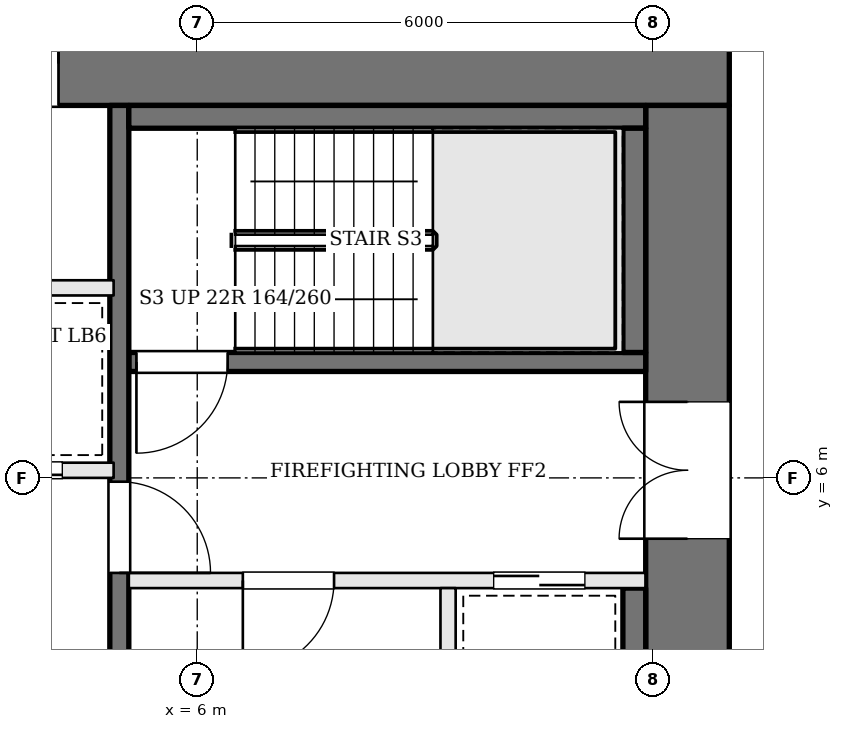
"""IFC4 building model, lengths in metres.
Left out: names, types, materials, properties, quantities, classifications, styles, units other than length and angle.
Written with IfcOpenShell. Run it as: python <this file> out.ifc"""

import sys

from ifc_helpers import new_model, si_unit, direction, frame, frame_2d, origin, place, context, subcontext, project, spatial, rectangle, extrude, element, fill, save


model = new_model("IFC4")
c1 = context("Model", 3, precision=1e-05, world=origin(), true_north=direction((0.0, 1.0)))
c2 = subcontext(c1, "Body", "Model", "MODEL_VIEW")
j1 = project(units=[si_unit("LENGTHUNIT", "METRE"), si_unit("PLANEANGLEUNIT", "RADIAN")], contexts=[c1])
p1 = place(None, origin())
s1 = spatial("IfcSite", under=j1, at=p1, CompositionType="ELEMENT")
p2 = place(p1, origin())
s2 = spatial("IfcBuilding", under=s1, at=p2, CompositionType="ELEMENT")
p3 = place(p2, frame((0.0, 0.0, 96.0)))
s3 = spatial("IfcBuildingStorey", under=s2, at=p3, CompositionType="ELEMENT", Elevation=96.0)
p4 = place(p3, frame((-13.0, 11.45, 0.0), z_axis=(0.0, 0.0, 1.0), x_axis=(1.0, 0.0, 0.0)))
e1 = element("IfcWall", 1, at=p4, inside=s3, PredefinedType="SHEAR", context=c2, shape_type="SweptSolid", body=[
    extrude(rectangle(XDim=26.0, YDim=1.1, at=frame_2d((13.0, 0.0))), origin(), (0.0, 0.0, 1.0), 3.6),
])
p5 = place(p4, frame((8.575, 0.0, 0.0)))
e2 = element("IfcOpeningElement", 2, at=p5, cuts=e1, PredefinedType="OPENING", context=c2, shape_type="SweptSolid", body=[
    extrude(rectangle(XDim=0.7, YDim=2.1, at=frame_2d((0.35, 1.05))), frame((0.0, 0.56, 0.0), z_axis=(0.0, -1.0, 0.0), x_axis=(1.0, 0.0, 0.0)), (0.0, 0.0, 1.0), 1.12),
])
p6 = place(p4, frame((10.875, 0.0, 0.0)))
e3 = element("IfcOpeningElement", 3, at=p6, cuts=e1, PredefinedType="OPENING", context=c2, shape_type="SweptSolid", body=[
    extrude(rectangle(XDim=1.0, YDim=2.1, at=frame_2d((0.5, 1.05))), frame((0.0, 0.56, 0.0), z_axis=(0.0, -1.0, 0.0), x_axis=(1.0, 0.0, 0.0)), (0.0, 0.0, 1.0), 1.12),
])
p7 = place(p4, frame((13.725, 0.0, 0.0)))
e4 = element("IfcOpeningElement", 4, at=p7, cuts=e1, PredefinedType="OPENING", context=c2, shape_type="SweptSolid", body=[
    extrude(rectangle(XDim=1.0, YDim=2.1, at=frame_2d((0.5, 1.05))), frame((0.0, 0.56, 0.0), z_axis=(0.0, -1.0, 0.0), x_axis=(1.0, 0.0, 0.0)), (0.0, 0.0, 1.0), 1.12),
])
p8 = place(p4, frame((16.175, 0.0, 0.0)))
e5 = element("IfcOpeningElement", 5, at=p8, cuts=e1, PredefinedType="OPENING", context=c2, shape_type="SweptSolid", body=[
    extrude(rectangle(XDim=1.0, YDim=2.1, at=frame_2d((0.5, 1.05))), frame((0.0, 0.56, 0.0), z_axis=(0.0, -1.0, 0.0), x_axis=(1.0, 0.0, 0.0)), (0.0, 0.0, 1.0), 1.12),
])
p9 = place(p3, frame((12.45, -1.9, 0.0), z_axis=(0.0, 0.0, 1.0), x_axis=(0.0, 1.0, 0.0)))
e6 = element("IfcWall", 6, at=p9, inside=s3, PredefinedType="SHEAR", context=c2, shape_type="SweptSolid", body=[
    extrude(rectangle(XDim=12.8, YDim=1.1, at=frame_2d((6.4, 0.0))), origin(), (0.0, 0.0, 1.0), 3.6),
])
p10 = place(p9, frame((7.1, 0.0, 0.0)))
e7 = element("IfcOpeningElement", 7, at=p10, cuts=e6, PredefinedType="OPENING", context=c2, shape_type="SweptSolid", body=[
    extrude(rectangle(XDim=1.8, YDim=2.1, at=frame_2d((0.9, 1.05))), frame((0.0, 0.56, 0.0), z_axis=(0.0, -1.0, 0.0), x_axis=(1.0, 0.0, 0.0)), (0.0, 0.0, 1.0), 1.12),
])
p11 = place(p3, frame((11.9, 7.525, 0.0), z_axis=(0.0, 0.0, 1.0), x_axis=(-1.0, 0.0, 0.0)))
e8 = element("IfcWall", 8, at=p11, inside=s3, PredefinedType="SOLIDWALL", context=c2, shape_type="SweptSolid", body=[
    extrude(rectangle(XDim=6.8, YDim=0.25, at=frame_2d((3.4, 0.0))), origin(), (0.0, 0.0, 1.0), 3.4),
])
p12 = place(p11, frame((5.5, 0.0, 0.0)))
e9 = element("IfcOpeningElement", 9, at=p12, cuts=e8, PredefinedType="OPENING", context=c2, shape_type="SweptSolid", body=[
    extrude(rectangle(XDim=1.2, YDim=2.1, at=frame_2d((0.6, 1.05))), frame((0.0, 0.135, 0.0), z_axis=(0.0, -1.0, 0.0), x_axis=(1.0, 0.0, 0.0)), (0.0, 0.0, 1.0), 0.27),
])
p13 = place(p3, frame((11.9, 4.65, 0.0), z_axis=(0.0, 0.0, 1.0), x_axis=(-1.0, 0.0, 0.0)))
e10 = element("IfcWall", 10, at=p13, inside=s3, PredefinedType="SOLIDWALL", context=c2, shape_type="SweptSolid", body=[
    extrude(rectangle(XDim=6.8, YDim=0.2, at=frame_2d((3.4, 0.0))), origin(), (0.0, 0.0, 1.0), 3.4),
])
p14 = place(p13, frame((4.1, 0.0, 0.0)))
e11 = element("IfcOpeningElement", 11, at=p14, cuts=e10, PredefinedType="OPENING", context=c2, shape_type="SweptSolid", body=[
    extrude(rectangle(XDim=1.2, YDim=2.1, at=frame_2d((0.6, 1.05))), frame((0.0, 0.11, 0.0), z_axis=(0.0, -1.0, 0.0), x_axis=(1.0, 0.0, 0.0)), (0.0, 0.0, 1.0), 0.22),
])
p15 = place(p13, frame((0.8, 0.0, 0.0)))
e12 = element("IfcOpeningElement", 12, at=p15, cuts=e10, PredefinedType="OPENING", context=c2, shape_type="SweptSolid", body=[
    extrude(rectangle(XDim=1.2, YDim=2.1, at=frame_2d((0.6, 1.05))), frame((0.0, 0.11, 0.0), z_axis=(0.0, -1.0, 0.0), x_axis=(1.0, 0.0, 0.0)), (0.0, 0.0, 1.0), 0.22),
])
p16 = place(p3, frame((9.3, 4.55, 0.0), z_axis=(0.0, 0.0, 1.0), x_axis=(0.0, -1.0, 0.0)))
e13 = element("IfcWall", 13, at=p16, inside=s3, PredefinedType="SOLIDWALL", context=c2, shape_type="SweptSolid", body=[
    extrude(rectangle(XDim=3.0, YDim=0.2, at=frame_2d((1.5, 0.0))), origin(), (0.0, 0.0, 1.0), 3.4),
])
p17 = place(p3, frame((4.975, 10.9, 0.0), z_axis=(0.0, 0.0, 1.0), x_axis=(0.0, -1.0, 0.0)))
e14 = element("IfcWall", 14, at=p17, inside=s3, PredefinedType="SOLIDWALL", context=c2, shape_type="SweptSolid", body=[
    extrude(rectangle(XDim=12.8, YDim=0.25, at=frame_2d((6.4, 0.0))), origin(), (0.0, 0.0, 1.0), 3.4),
])
p18 = place(p17, frame((4.95, 0.0, 0.0)))
e15 = element("IfcOpeningElement", 15, at=p18, cuts=e14, PredefinedType="OPENING", context=c2, shape_type="SweptSolid", body=[
    extrude(rectangle(XDim=1.2, YDim=2.1, at=frame_2d((0.6, 1.05))), frame((0.0, 0.135, 0.0), z_axis=(0.0, -1.0, 0.0), x_axis=(1.0, 0.0, 0.0)), (0.0, 0.0, 1.0), 0.27),
])
p19 = place(p3, frame((11.9, 10.75, 0.0), z_axis=(0.0, 0.0, 1.0), x_axis=(-1.0, 0.0, 0.0)))
e16 = element("IfcWall", 16, at=p19, inside=s3, PredefinedType="SOLIDWALL", context=c2, shape_type="SweptSolid", body=[
    extrude(rectangle(XDim=6.8, YDim=0.3, at=frame_2d((3.4, 0.0))), origin(), (0.0, 0.0, 1.0), 3.4),
])
p20 = place(p3, frame((11.75, 10.6, 0.0), z_axis=(0.0, 0.0, 1.0), x_axis=(0.0, -1.0, 0.0)))
e17 = element("IfcWall", 17, at=p20, inside=s3, PredefinedType="SOLIDWALL", context=c2, shape_type="SweptSolid", body=[
    extrude(rectangle(XDim=2.95, YDim=0.3, at=frame_2d((1.475, 0.0))), origin(), (0.0, 0.0, 1.0), 3.4),
])
p21 = place(p3, frame((11.75, 4.55, 0.0), z_axis=(0.0, 0.0, 1.0), x_axis=(0.0, -1.0, 0.0)))
e18 = element("IfcWall", 18, at=p21, inside=s3, PredefinedType="SOLIDWALL", context=c2, shape_type="SweptSolid", body=[
    extrude(rectangle(XDim=3.0, YDim=0.3, at=frame_2d((1.5, 0.0))), origin(), (0.0, 0.0, 1.0), 3.4),
])
p22 = place(p3, frame((-4.9, 6.1, 0.0), z_axis=(0.0, 0.0, 1.0), x_axis=(1.0, 0.0, 0.0)))
e19 = element("IfcWall", 19, at=p22, inside=s3, PredefinedType="SOLIDWALL", context=c2, shape_type="SweptSolid", body=[
    extrude(rectangle(XDim=9.8, YDim=0.2, at=frame_2d((4.9, 0.0))), origin(), (0.0, 0.0, 1.0), 3.4),
])
p23 = place(p22, frame((0.675, 0.0, 0.0)))
e20 = element("IfcOpeningElement", 20, at=p23, cuts=e19, PredefinedType="OPENING", context=c2, shape_type="SweptSolid", body=[
    extrude(rectangle(XDim=1.1, YDim=2.1, at=frame_2d((0.55, 1.05))), frame((0.0, 0.11, 0.0), z_axis=(0.0, -1.0, 0.0), x_axis=(1.0, 0.0, 0.0)), (0.0, 0.0, 1.0), 0.22),
])
p24 = place(p22, frame((3.125, 0.0, 0.0)))
e21 = element("IfcOpeningElement", 21, at=p24, cuts=e19, PredefinedType="OPENING", context=c2, shape_type="SweptSolid", body=[
    extrude(rectangle(XDim=1.1, YDim=2.1, at=frame_2d((0.55, 1.05))), frame((0.0, 0.11, 0.0), z_axis=(0.0, -1.0, 0.0), x_axis=(1.0, 0.0, 0.0)), (0.0, 0.0, 1.0), 0.22),
])
p25 = place(p22, frame((5.575, 0.0, 0.0)))
e22 = element("IfcOpeningElement", 22, at=p25, cuts=e19, PredefinedType="OPENING", context=c2, shape_type="SweptSolid", body=[
    extrude(rectangle(XDim=1.1, YDim=2.1, at=frame_2d((0.55, 1.05))), frame((0.0, 0.11, 0.0), z_axis=(0.0, -1.0, 0.0), x_axis=(1.0, 0.0, 0.0)), (0.0, 0.0, 1.0), 0.22),
])
p26 = place(p22, frame((8.025, 0.0, 0.0)))
e23 = element("IfcOpeningElement", 23, at=p26, cuts=e19, PredefinedType="OPENING", context=c2, shape_type="SweptSolid", body=[
    extrude(rectangle(XDim=1.1, YDim=2.1, at=frame_2d((0.55, 1.05))), frame((0.0, 0.11, 0.0), z_axis=(0.0, -1.0, 0.0), x_axis=(1.0, 0.0, 0.0)), (0.0, 0.0, 1.0), 0.22),
])
p27 = place(p3, frame((-4.9, 8.5, 0.0), z_axis=(0.0, 0.0, 1.0), x_axis=(1.0, 0.0, 0.0)))
e24 = element("IfcWall", 24, at=p27, inside=s3, PredefinedType="SOLIDWALL", context=c2, shape_type="SweptSolid", body=[
    extrude(rectangle(XDim=9.8, YDim=0.2, at=frame_2d((4.9, 0.0))), origin(), (0.0, 0.0, 1.0), 3.4),
])
p28 = place(p10, origin())
e25 = element("IfcDoor", 25, at=p28, inside=s3, OperationType="DOUBLE_DOOR_SINGLE_SWING", PredefinedType="DOOR", context=c2, shape_type="SweptSolid", body=[
    extrude(rectangle(XDim=1.8, YDim=2.1, at=frame_2d((0.9, 1.05))), frame((0.0, 0.025, 0.0), z_axis=(0.0, -1.0, 0.0), x_axis=(1.0, 0.0, 0.0)), (0.0, 0.0, 1.0), 0.05),
])
fill(e7, e25)
p29 = place(p18, origin())
e26 = element("IfcDoor", 26, at=p29, inside=s3, OperationType="SINGLE_SWING_RIGHT", PredefinedType="DOOR", context=c2, shape_type="SweptSolid", body=[
    extrude(rectangle(XDim=1.2, YDim=2.1, at=frame_2d((0.6, 1.05))), frame((0.0, 0.025, 0.0), z_axis=(0.0, -1.0, 0.0), x_axis=(1.0, 0.0, 0.0)), (0.0, 0.0, 1.0), 0.05),
])
fill(e15, e26)
p30 = place(p14, origin())
e27 = element("IfcDoor", 27, at=p30, inside=s3, OperationType="SINGLE_SWING_RIGHT", PredefinedType="DOOR", context=c2, shape_type="SweptSolid", body=[
    extrude(rectangle(XDim=1.2, YDim=2.1, at=frame_2d((0.6, 1.05))), frame((0.0, 0.025, 0.0), z_axis=(0.0, -1.0, 0.0), x_axis=(1.0, 0.0, 0.0)), (0.0, 0.0, 1.0), 0.05),
])
fill(e11, e27)
p31 = place(p12, origin())
e28 = element("IfcDoor", 28, at=p31, inside=s3, OperationType="SINGLE_SWING_RIGHT", PredefinedType="DOOR", context=c2, shape_type="SweptSolid", body=[
    extrude(rectangle(XDim=1.2, YDim=2.1, at=frame_2d((0.6, 1.05))), frame((0.0, 0.025, 0.0), z_axis=(0.0, -1.0, 0.0), x_axis=(1.0, 0.0, 0.0)), (0.0, 0.0, 1.0), 0.05),
])
fill(e9, e28)
p32 = place(p15, origin())
e29 = element("IfcDoor", 29, at=p32, inside=s3, OperationType="SLIDING_TO_RIGHT", PredefinedType="DOOR", context=c2, shape_type="SweptSolid", body=[
    extrude(rectangle(XDim=1.2, YDim=2.1, at=frame_2d((0.6, 1.05))), frame((0.0, 0.025, 0.0), z_axis=(0.0, -1.0, 0.0), x_axis=(1.0, 0.0, 0.0)), (0.0, 0.0, 1.0), 0.05),
])
fill(e12, e29)
p33 = place(p26, origin())
e30 = element("IfcDoor", 30, at=p33, inside=s3, OperationType="SLIDING_TO_LEFT", PredefinedType="DOOR", context=c2, shape_type="SweptSolid", body=[
    extrude(rectangle(XDim=1.1, YDim=2.1, at=frame_2d((0.55, 1.05))), frame((0.0, 0.025, 0.0), z_axis=(0.0, -1.0, 0.0), x_axis=(1.0, 0.0, 0.0)), (0.0, 0.0, 1.0), 0.05),
])
fill(e23, e30)
p34 = place(p8, origin())
e31 = element("IfcDoor", 31, at=p34, inside=s3, OperationType="SINGLE_SWING_RIGHT", PredefinedType="DOOR", context=c2, shape_type="SweptSolid", body=[
    extrude(rectangle(XDim=1.0, YDim=2.1, at=frame_2d((0.5, 1.05))), frame((0.0, 0.025, 0.0), z_axis=(0.0, -1.0, 0.0), x_axis=(1.0, 0.0, 0.0)), (0.0, 0.0, 1.0), 0.05),
])
fill(e5, e31)
save(model, sys.argv[1])
